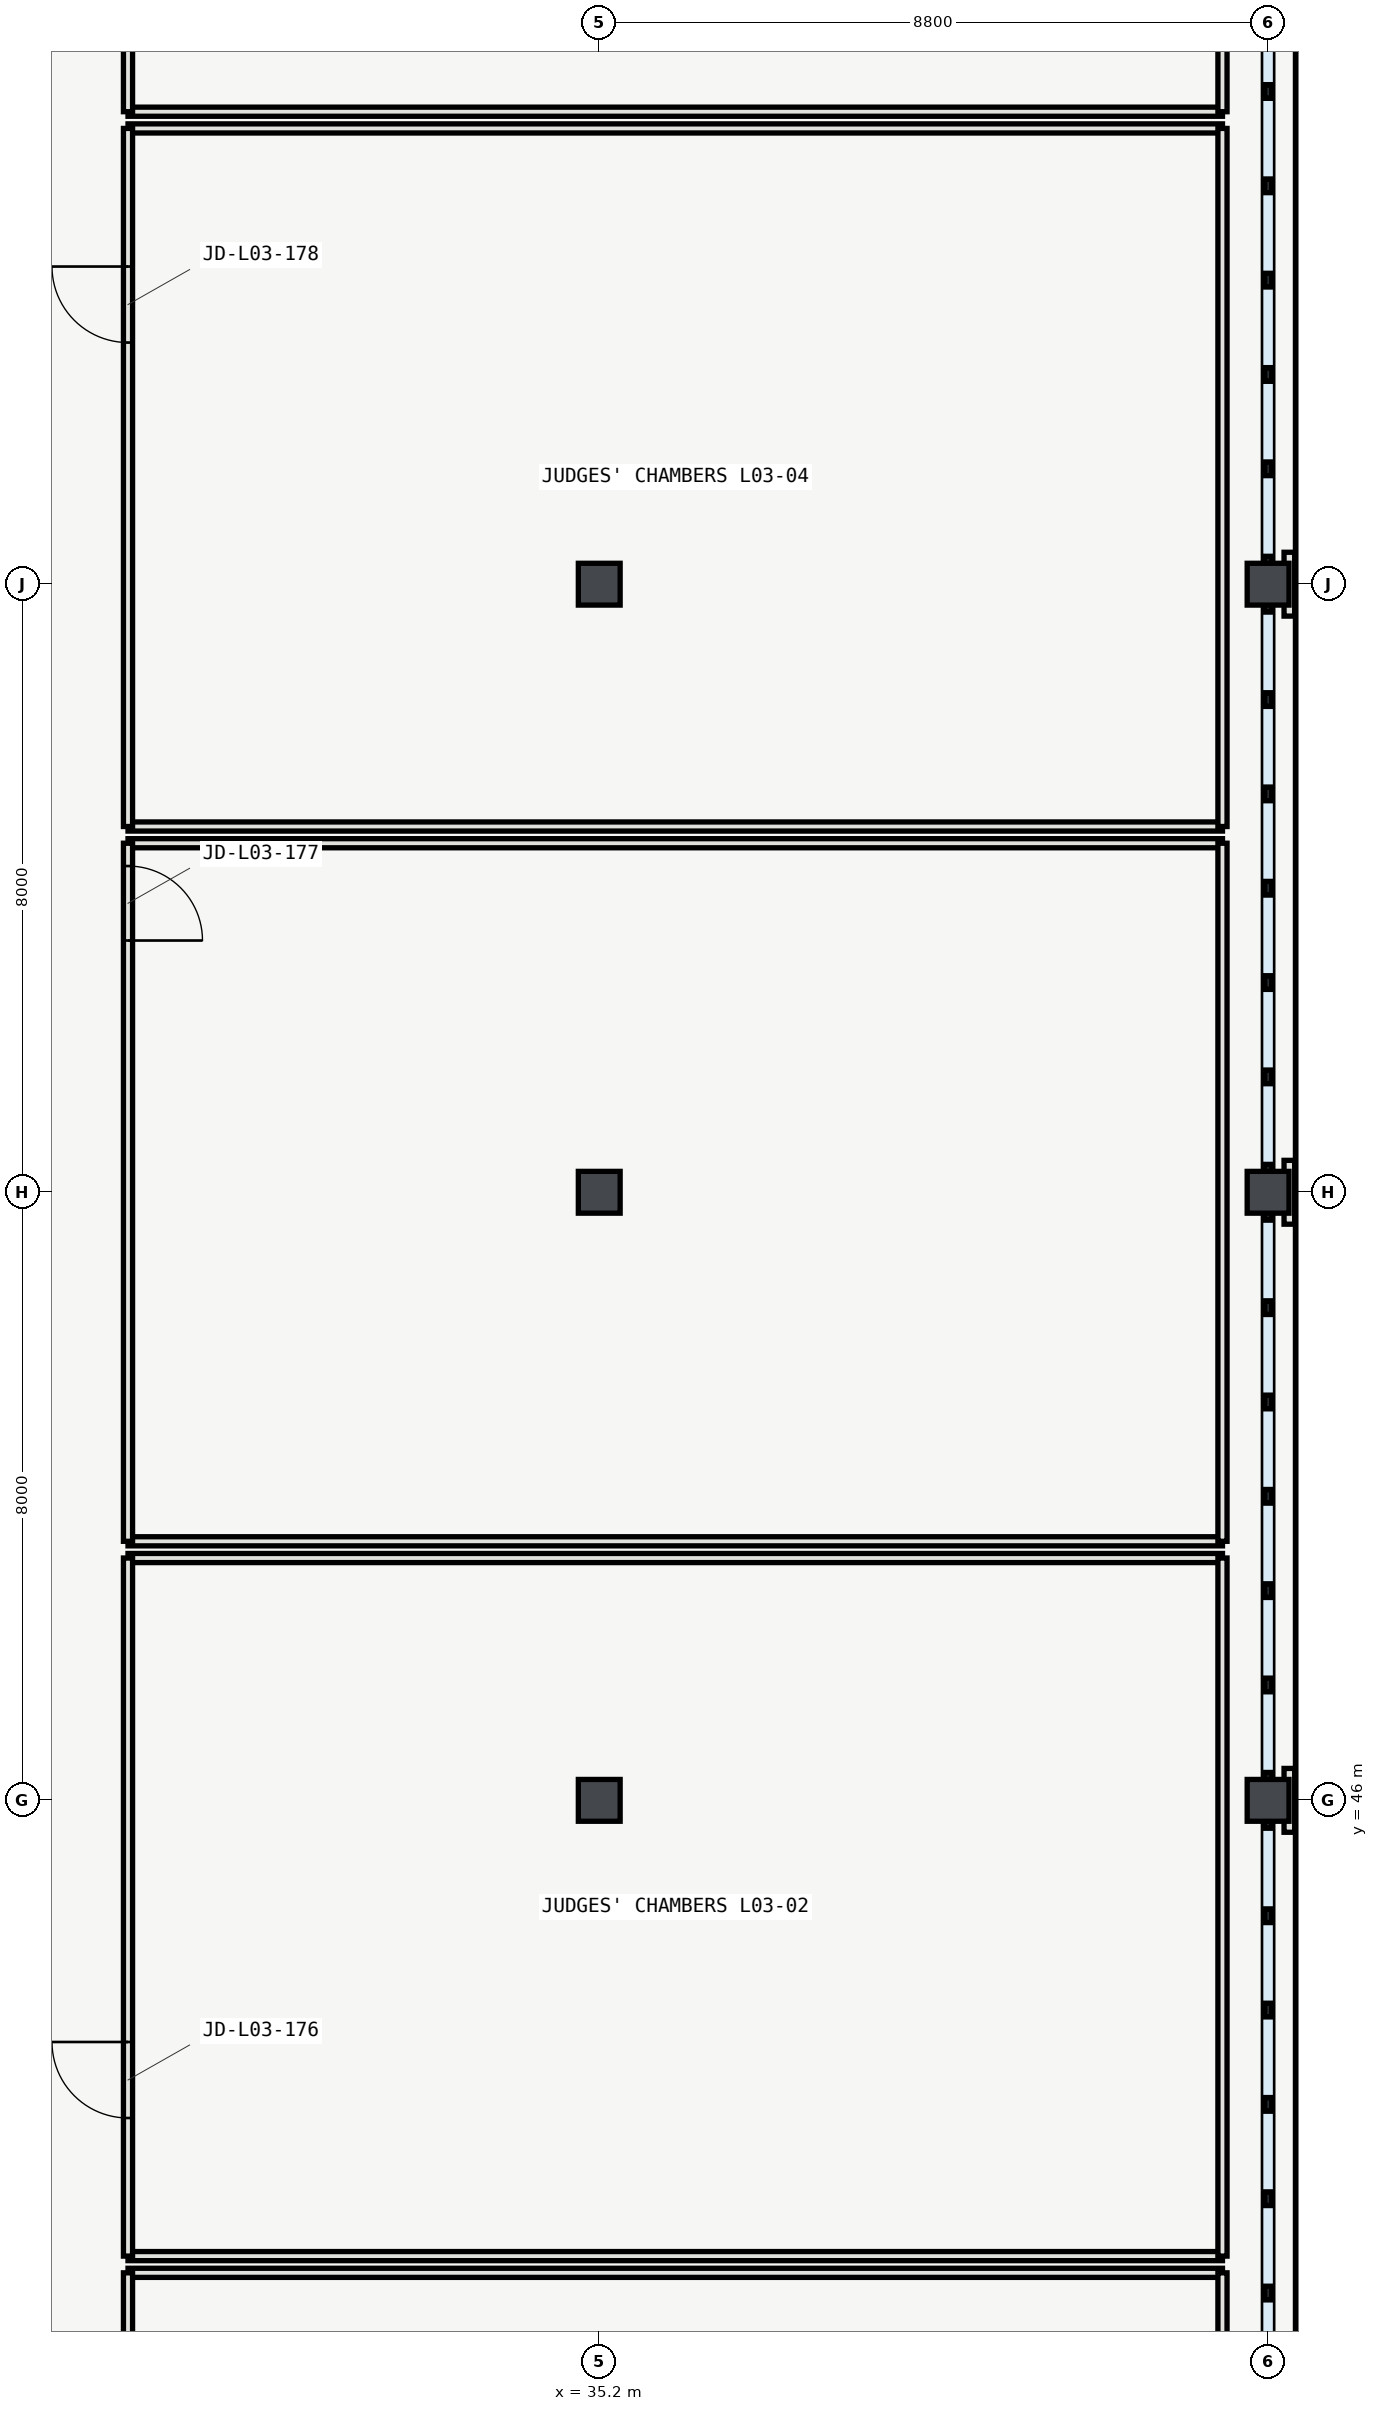
"""IFC4 building model, lengths in metres.
Left out: names, types, materials, properties, quantities, classifications, styles, units other than length and angle.
Written with IfcOpenShell. Run it as: python <this file> out.ifc"""

import sys

from ifc_helpers import new_model, si_unit, direction, frame, frame_2d, origin, origin_2d, place, context, subcontext, project, spatial, rectangle, hollow_rectangle, extrude, element, fill, save


model = new_model("IFC4")
c1 = context("Model", 3, precision=1e-05, world=origin(), true_north=direction((0.0, 1.0)))
c2 = subcontext(c1, "Body", "Model", "MODEL_VIEW")
j1 = project(units=[si_unit("LENGTHUNIT", "METRE"), si_unit("PLANEANGLEUNIT", "RADIAN")], contexts=[c1])
p1 = place(None, origin())
s1 = spatial("IfcSite", under=j1, at=p1, CompositionType="ELEMENT")
p2 = place(p1, origin())
s2 = spatial("IfcBuilding", under=s1, at=p2, CompositionType="ELEMENT")
p3 = place(p2, frame((0.0, 0.0, 16.2)))
s3 = spatial("IfcBuildingStorey", under=s2, at=p3, CompositionType="ELEMENT", Elevation=16.2)
for number, where, z_axis, x_axis in (
    (1, (35.2, 46.0, 0.0), (0.0, 0.0, 1.0), (1.0, 0.0, 0.0)),
    (2, (35.2, 54.0, 0.0), (0.0, 0.0, 1.0), (1.0, 0.0, 0.0)),
    (3, (35.2, 62.0, 0.0), (0.0, 0.0, 1.0), (1.0, 0.0, 0.0)),
    (4, (44.0, 46.0, 0.0), (0.0, 0.0, 1.0), (1.0, 0.0, 0.0)),
    (5, (44.0, 54.0, 0.0), (0.0, 0.0, 1.0), (1.0, 0.0, 0.0)),
    (6, (44.0, 62.0, 0.0), (0.0, 0.0, 1.0), (1.0, 0.0, 0.0)),
):
    element("IfcColumn", number, at=place(p3, frame(where, z_axis=z_axis, x_axis=x_axis)), inside=s3, PredefinedType="COLUMN", context=c2, shape_type="SweptSolid", body=[
        extrude(hollow_rectangle(XDim=0.55, YDim=0.55, WallThickness=0.022, InnerFilletRadius=0.022, OuterFilletRadius=0.044, at=origin_2d()), origin(), (0.0, 0.0, 1.0), 4.2),
    ])
p4 = place(p3, frame((44.44, 30.0, 0.0), z_axis=(0.0, 0.0, 1.0), x_axis=(0.0, 1.0, 0.0)))
e7 = element("IfcWall", 7, at=p4, inside=s3, PredefinedType="SOLIDWALL", context=c2, shape_type="SweptSolid", body=[
    extrude(rectangle(XDim=48.0, YDim=0.16, at=frame_2d((24.0, 0.0))), origin(), (0.0, 0.0, 1.0), 0.58),
])
for number, where, z_axis, x_axis in (
    (8, (44.28, 45.58, 0.0), (0.0, 0.0, 1.0), (0.0, 1.0, 0.0)),
    (9, (44.28, 53.58, 0.0), (0.0, 0.0, 1.0), (0.0, 1.0, 0.0)),
    (10, (44.28, 61.58, 0.0), (0.0, 0.0, 1.0), (0.0, 1.0, 0.0)),
):
    element("IfcWall", number, at=place(p3, frame(where, z_axis=z_axis, x_axis=x_axis)), inside=s3, PredefinedType="SOLIDWALL", context=c2, shape_type="SweptSolid", body=[
        extrude(rectangle(XDim=0.84, YDim=0.14, at=frame_2d((0.42, 0.0))), origin(), (0.0, 0.0, 1.0), 3.94),
    ])
p5 = place(p3, frame((43.4, 39.784, 0.0), z_axis=(0.0, 0.0, 1.0), x_axis=(-1.0, 0.0, 0.0)))
e11 = element("IfcWall", 11, at=p5, inside=s3, PredefinedType="PARTITIONING", context=c2, shape_type="SweptSolid", body=[
    extrude(rectangle(XDim=14.4, YDim=0.12, at=frame_2d((7.2, 0.0))), origin(), (0.0, 0.0, 1.0), 3.92),
])
p6 = place(p3, frame((29.0, 39.784, 0.0), z_axis=(0.0, 0.0, 1.0), x_axis=(0.0, -1.0, 0.0)))
e12 = element("IfcWall", 12, at=p6, inside=s3, PredefinedType="PARTITIONING", context=c2, shape_type="SweptSolid", body=[
    extrude(rectangle(XDim=9.184, YDim=0.12, at=frame_2d((4.592, 0.0))), origin(), (0.0, 0.0, 1.0), 3.92),
])
p7 = place(p6, frame((5.623, 0.0, 0.0)))
e13 = element("IfcOpeningElement", 13, at=p7, cuts=e12, PredefinedType="OPENING", context=c2, shape_type="SweptSolid", body=[
    extrude(rectangle(XDim=0.98, YDim=2.15, at=frame_2d((0.49, 1.075))), frame((0.0, 0.07, 0.0), z_axis=(0.0, -1.0, 0.0), x_axis=(1.0, 0.0, 0.0)), (0.0, 0.0, 1.0), 0.14),
])
p8 = place(p3, frame((43.4, 30.6, 0.0), z_axis=(0.0, 0.0, 1.0), x_axis=(0.0, 1.0, 0.0)))
e14 = element("IfcWall", 14, at=p8, inside=s3, PredefinedType="PARTITIONING", context=c2, shape_type="SweptSolid", body=[
    extrude(rectangle(XDim=9.184, YDim=0.12, at=frame_2d((4.592, 0.0))), origin(), (0.0, 0.0, 1.0), 3.92),
])
for number, where, z_axis, x_axis in (
    (15, (29.0, 40.004, 0.0), (0.0, 0.0, 1.0), (1.0, 0.0, 0.0)),
    (16, (43.4, 49.188, 0.0), (0.0, 0.0, 1.0), (-1.0, 0.0, 0.0)),
):
    element("IfcWall", number, at=place(p3, frame(where, z_axis=z_axis, x_axis=x_axis)), inside=s3, PredefinedType="PARTITIONING", context=c2, shape_type="SweptSolid", body=[
        extrude(rectangle(XDim=14.4, YDim=0.12, at=frame_2d((7.2, 0.0))), origin(), (0.0, 0.0, 1.0), 3.92),
    ])
p9 = place(p3, frame((29.0, 49.188, 0.0), z_axis=(0.0, 0.0, 1.0), x_axis=(0.0, -1.0, 0.0)))
e17 = element("IfcWall", 17, at=p9, inside=s3, PredefinedType="PARTITIONING", context=c2, shape_type="SweptSolid", body=[
    extrude(rectangle(XDim=9.184, YDim=0.12, at=frame_2d((4.592, 0.0))), origin(), (0.0, 0.0, 1.0), 3.92),
])
p10 = place(p9, frame((6.367, 0.0, 0.0)))
e18 = element("IfcOpeningElement", 18, at=p10, cuts=e17, PredefinedType="OPENING", context=c2, shape_type="SweptSolid", body=[
    extrude(rectangle(XDim=1.0, YDim=2.2, at=frame_2d((0.5, 1.1))), frame((0.0, 0.07, 0.0), z_axis=(0.0, -1.0, 0.0), x_axis=(1.0, 0.0, 0.0)), (0.0, 0.0, 1.0), 0.14),
])
p11 = place(p3, frame((43.4, 40.004, 0.0), z_axis=(0.0, 0.0, 1.0), x_axis=(0.0, 1.0, 0.0)))
e19 = element("IfcWall", 19, at=p11, inside=s3, PredefinedType="PARTITIONING", context=c2, shape_type="SweptSolid", body=[
    extrude(rectangle(XDim=9.184, YDim=0.12, at=frame_2d((4.592, 0.0))), origin(), (0.0, 0.0, 1.0), 3.92),
])
for number, where, z_axis, x_axis in (
    (20, (29.0, 49.408, 0.0), (0.0, 0.0, 1.0), (1.0, 0.0, 0.0)),
    (21, (43.4, 58.592, 0.0), (0.0, 0.0, 1.0), (-1.0, 0.0, 0.0)),
):
    element("IfcWall", number, at=place(p3, frame(where, z_axis=z_axis, x_axis=x_axis)), inside=s3, PredefinedType="PARTITIONING", context=c2, shape_type="SweptSolid", body=[
        extrude(rectangle(XDim=14.4, YDim=0.12, at=frame_2d((7.2, 0.0))), origin(), (0.0, 0.0, 1.0), 3.92),
    ])
p12 = place(p3, frame((29.0, 58.592, 0.0), z_axis=(0.0, 0.0, 1.0), x_axis=(0.0, -1.0, 0.0)))
e22 = element("IfcWall", 22, at=p12, inside=s3, PredefinedType="PARTITIONING", context=c2, shape_type="SweptSolid", body=[
    extrude(rectangle(XDim=9.184, YDim=0.12, at=frame_2d((4.592, 0.0))), origin(), (0.0, 0.0, 1.0), 3.92),
])
p13 = place(p12, frame((0.3, 0.0, 0.0)))
e23 = element("IfcOpeningElement", 23, at=p13, cuts=e22, PredefinedType="OPENING", context=c2, shape_type="SweptSolid", body=[
    extrude(rectangle(XDim=0.98, YDim=2.2, at=frame_2d((0.49, 1.1))), frame((0.0, 0.07, 0.0), z_axis=(0.0, -1.0, 0.0), x_axis=(1.0, 0.0, 0.0)), (0.0, 0.0, 1.0), 0.14),
])
p14 = place(p3, frame((43.4, 49.408, 0.0), z_axis=(0.0, 0.0, 1.0), x_axis=(0.0, 1.0, 0.0)))
e24 = element("IfcWall", 24, at=p14, inside=s3, PredefinedType="PARTITIONING", context=c2, shape_type="SweptSolid", body=[
    extrude(rectangle(XDim=9.184, YDim=0.12, at=frame_2d((4.592, 0.0))), origin(), (0.0, 0.0, 1.0), 3.92),
])
for number, where, z_axis, x_axis in (
    (25, (29.0, 58.812, 0.0), (0.0, 0.0, 1.0), (1.0, 0.0, 0.0)),
    (26, (43.4, 67.996, 0.0), (0.0, 0.0, 1.0), (-1.0, 0.0, 0.0)),
):
    element("IfcWall", number, at=place(p3, frame(where, z_axis=z_axis, x_axis=x_axis)), inside=s3, PredefinedType="PARTITIONING", context=c2, shape_type="SweptSolid", body=[
        extrude(rectangle(XDim=14.4, YDim=0.12, at=frame_2d((7.2, 0.0))), origin(), (0.0, 0.0, 1.0), 3.92),
    ])
p15 = place(p3, frame((29.0, 67.996, 0.0), z_axis=(0.0, 0.0, 1.0), x_axis=(0.0, -1.0, 0.0)))
e27 = element("IfcWall", 27, at=p15, inside=s3, PredefinedType="PARTITIONING", context=c2, shape_type="SweptSolid", body=[
    extrude(rectangle(XDim=9.184, YDim=0.12, at=frame_2d((4.592, 0.0))), origin(), (0.0, 0.0, 1.0), 3.92),
])
p16 = place(p15, frame((1.817, 0.0, 0.0)))
e28 = element("IfcOpeningElement", 28, at=p16, cuts=e27, PredefinedType="OPENING", context=c2, shape_type="SweptSolid", body=[
    extrude(rectangle(XDim=1.0, YDim=2.15, at=frame_2d((0.5, 1.075))), frame((0.0, 0.07, 0.0), z_axis=(0.0, -1.0, 0.0), x_axis=(1.0, 0.0, 0.0)), (0.0, 0.0, 1.0), 0.14),
])
p17 = place(p3, frame((43.4, 58.812, 0.0), z_axis=(0.0, 0.0, 1.0), x_axis=(0.0, 1.0, 0.0)))
e29 = element("IfcWall", 29, at=p17, inside=s3, PredefinedType="PARTITIONING", context=c2, shape_type="SweptSolid", body=[
    extrude(rectangle(XDim=9.184, YDim=0.12, at=frame_2d((4.592, 0.0))), origin(), (0.0, 0.0, 1.0), 3.92),
])
p18 = place(p3, frame((29.0, 68.216, 0.0), z_axis=(0.0, 0.0, 1.0), x_axis=(1.0, 0.0, 0.0)))
e30 = element("IfcWall", 30, at=p18, inside=s3, PredefinedType="PARTITIONING", context=c2, shape_type="SweptSolid", body=[
    extrude(rectangle(XDim=14.4, YDim=0.12, at=frame_2d((7.2, 0.0))), origin(), (0.0, 0.0, 1.0), 3.92),
])
p19 = place(p3, frame((29.0, 77.4, 0.0), z_axis=(0.0, 0.0, 1.0), x_axis=(0.0, -1.0, 0.0)))
e31 = element("IfcWall", 31, at=p19, inside=s3, PredefinedType="PARTITIONING", context=c2, shape_type="SweptSolid", body=[
    extrude(rectangle(XDim=9.184, YDim=0.12, at=frame_2d((4.592, 0.0))), origin(), (0.0, 0.0, 1.0), 3.92),
])
p20 = place(p19, frame((2.581, 0.0, 0.0)))
e32 = element("IfcOpeningElement", 32, at=p20, cuts=e31, PredefinedType="OPENING", context=c2, shape_type="SweptSolid", body=[
    extrude(rectangle(XDim=0.98, YDim=2.15, at=frame_2d((0.49, 1.075))), frame((0.0, 0.07, 0.0), z_axis=(0.0, -1.0, 0.0), x_axis=(1.0, 0.0, 0.0)), (0.0, 0.0, 1.0), 0.14),
])
p21 = place(p3, frame((43.4, 68.216, 0.0), z_axis=(0.0, 0.0, 1.0), x_axis=(0.0, 1.0, 0.0)))
e33 = element("IfcWall", 33, at=p21, inside=s3, PredefinedType="PARTITIONING", context=c2, shape_type="SweptSolid", body=[
    extrude(rectangle(XDim=9.184, YDim=0.12, at=frame_2d((4.592, 0.0))), origin(), (0.0, 0.0, 1.0), 3.92),
])
p22 = place(p10, origin())
e34 = element("IfcDoor", 34, at=p22, inside=s3, OperationType="SINGLE_SWING_LEFT", PredefinedType="DOOR", context=c2, shape_type="SweptSolid", body=[
    extrude(rectangle(XDim=1.0, YDim=2.2, at=frame_2d((0.5, 1.1))), frame((0.0, 0.025, 0.0), z_axis=(0.0, -1.0, 0.0), x_axis=(1.0, 0.0, 0.0)), (0.0, 0.0, 1.0), 0.05),
])
fill(e18, e34)
p23 = place(p13, origin())
e35 = element("IfcDoor", 35, at=p23, inside=s3, OperationType="SINGLE_SWING_RIGHT", PredefinedType="DOOR", context=c2, shape_type="SweptSolid", body=[
    extrude(rectangle(XDim=0.98, YDim=2.2, at=frame_2d((0.49, 1.1))), frame((0.0, 0.025, 0.0), z_axis=(0.0, -1.0, 0.0), x_axis=(1.0, 0.0, 0.0)), (0.0, 0.0, 1.0), 0.05),
])
fill(e23, e35)
p24 = place(p16, origin())
e36 = element("IfcDoor", 36, at=p24, inside=s3, OperationType="SINGLE_SWING_LEFT", PredefinedType="DOOR", context=c2, shape_type="SweptSolid", body=[
    extrude(rectangle(XDim=1.0, YDim=2.15, at=frame_2d((0.5, 1.075))), frame((0.0, 0.025, 0.0), z_axis=(0.0, -1.0, 0.0), x_axis=(1.0, 0.0, 0.0)), (0.0, 0.0, 1.0), 0.05),
])
fill(e28, e36)
save(model, sys.argv[1])
